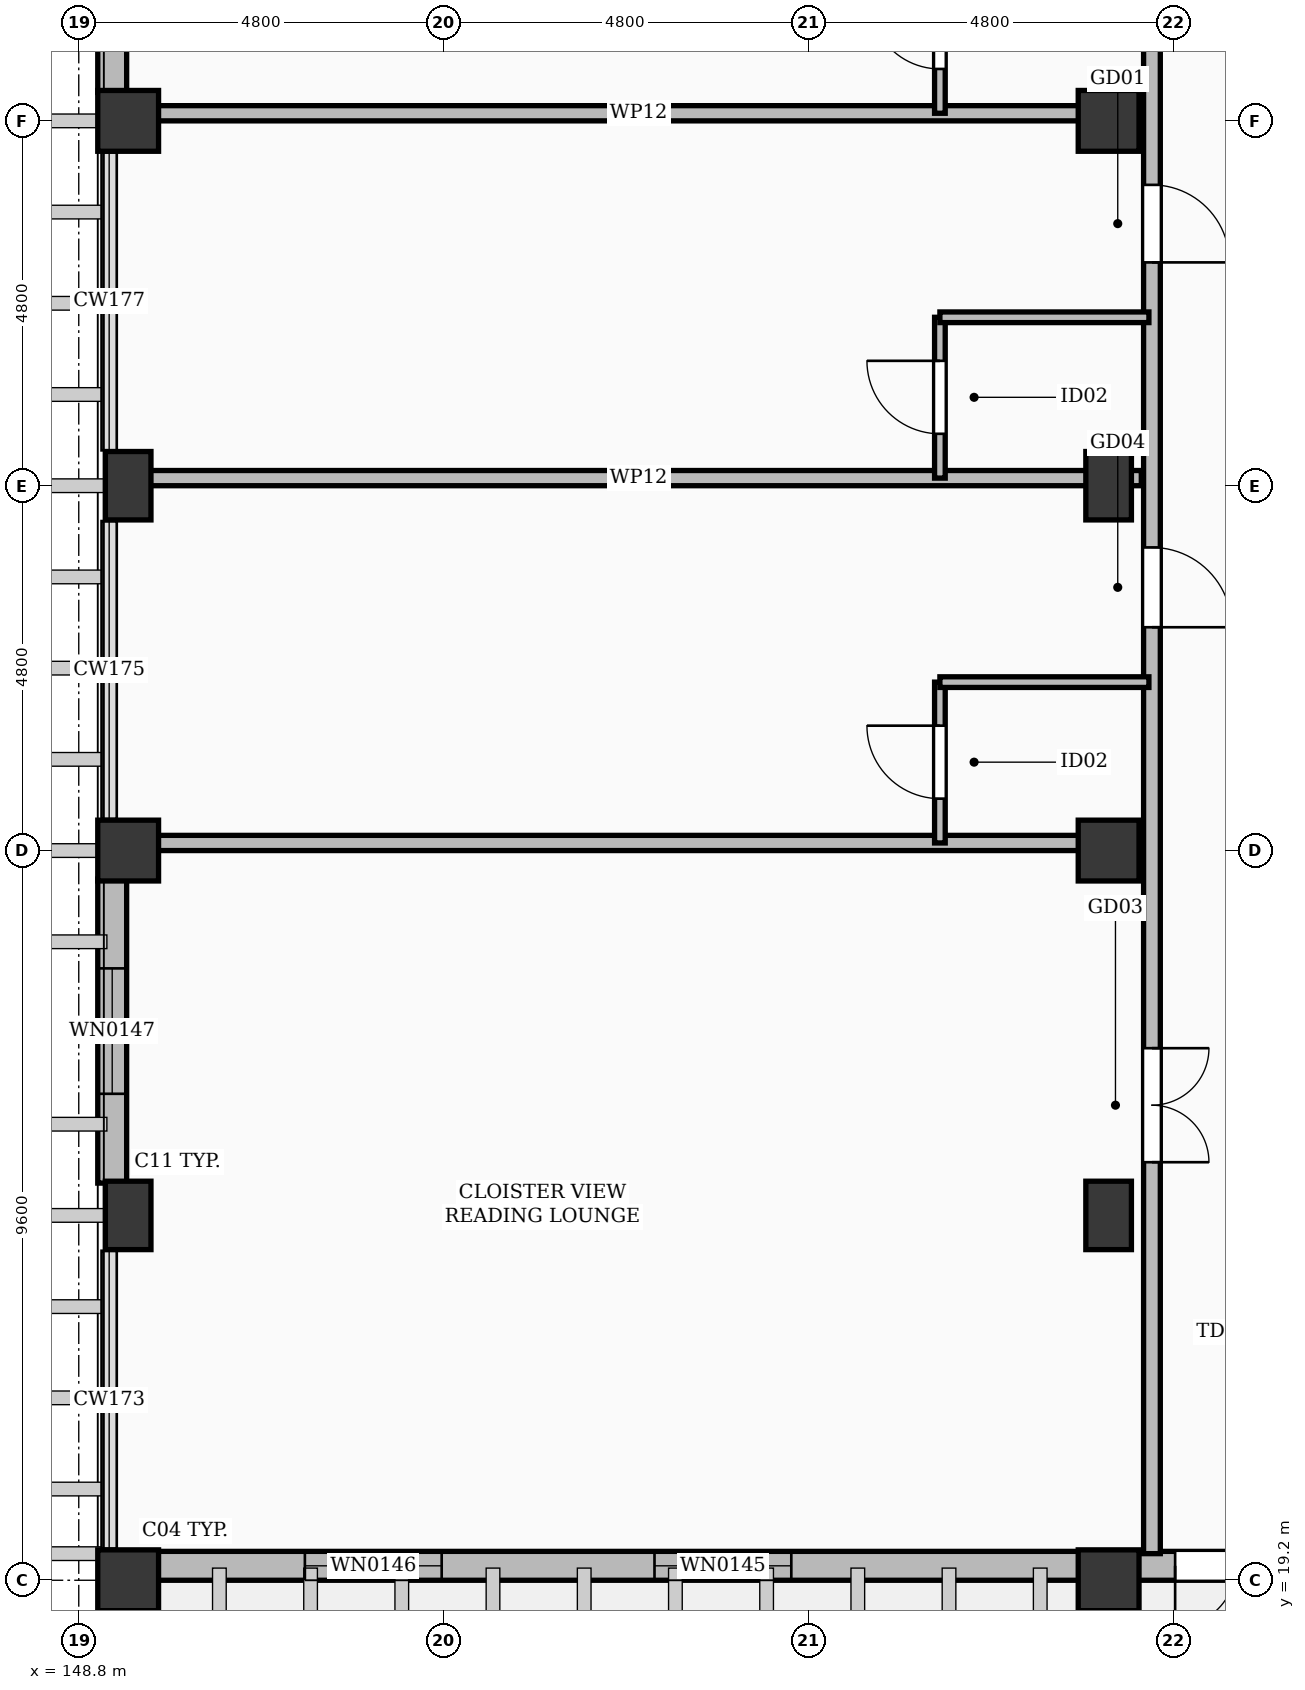
"""IFC4 building model, lengths in metres.
Left out: names, types, materials, properties, quantities, classifications, styles, units other than length and angle.
Written with IfcOpenShell. Run it as: python <this file> out.ifc"""

import sys

from ifc_helpers import new_model, si_unit, direction, frame, frame_2d, origin, origin_2d, place, context, subcontext, project, spatial, rectangle, extrude, element, fill, save


model = new_model("IFC4")
c1 = context("Model", 3, precision=1e-05, world=origin(), true_north=direction((0.0, 1.0)))
c2 = subcontext(c1, "Body", "Model", "MODEL_VIEW")
j1 = project(units=[si_unit("LENGTHUNIT", "METRE"), si_unit("PLANEANGLEUNIT", "RADIAN")], contexts=[c1])
p1 = place(None, origin())
s1 = spatial("IfcSite", under=j1, at=p1, CompositionType="ELEMENT")
p2 = place(p1, origin())
s2 = spatial("IfcBuilding", under=s1, at=p2, CompositionType="ELEMENT")
p3 = place(p2, frame((0.0, 0.0, 21.0)))
s3 = spatial("IfcBuildingStorey", under=s2, at=p3, CompositionType="ELEMENT", Elevation=21.0)
for number, where, z_axis, x_axis in (
    (1, (149.45, 19.2, 0.0), (0.0, 0.0, 1.0), (1.0, 0.0, 0.0)),
    (2, (149.45, 28.8, 0.0), (0.0, 0.0, 1.0), (1.0, 0.0, 0.0)),
    (3, (149.45, 38.4, 0.0), (0.0, 0.0, 1.0), (1.0, 0.0, 0.0)),
    (4, (162.35, 19.2, 0.0), (0.0, 0.0, 1.0), (1.0, 0.0, 0.0)),
    (5, (162.35, 28.8, 0.0), (0.0, 0.0, 1.0), (1.0, 0.0, 0.0)),
    (6, (162.35, 38.4, 0.0), (0.0, 0.0, 1.0), (1.0, 0.0, 0.0)),
):
    element("IfcColumn", number, at=place(p3, frame(where, z_axis=z_axis, x_axis=x_axis)), inside=s3, PredefinedType="COLUMN", context=c2, shape_type="SweptSolid", body=[
        extrude(rectangle(XDim=0.8, YDim=0.8, at=origin_2d()), origin(), (0.0, 0.0, 1.0), 3.6),
    ])
for number, where, z_axis, x_axis in (
    (7, (149.45, 24.0, -0.26), (0.0, 0.0, 1.0), (1.0, 0.0, 0.0)),
    (8, (149.45, 33.6, -0.26), (0.0, 0.0, 1.0), (1.0, 0.0, 0.0)),
    (9, (162.35, 24.0, -0.26), (0.0, 0.0, 1.0), (1.0, 0.0, 0.0)),
    (10, (162.35, 33.6, -0.26), (0.0, 0.0, 1.0), (1.0, 0.0, 0.0)),
):
    element("IfcColumn", number, at=place(p3, frame(where, z_axis=z_axis, x_axis=x_axis)), inside=s3, PredefinedType="COLUMN", context=c2, shape_type="SweptSolid", body=[
        extrude(rectangle(XDim=0.6, YDim=0.9, at=origin_2d()), origin(), (0.0, 0.0, 1.0), 3.86),
    ])
p4 = place(p3, frame((178.975, 19.39, 0.0), z_axis=(0.0, 0.0, 1.0), x_axis=(-1.0, 0.0, 0.0)))
e11 = element("IfcWall", 11, at=p4, inside=s3, PredefinedType="SOLIDWALL", context=c2, shape_type="SweptSolid", body=[
    extrude(rectangle(XDim=29.15, YDim=0.38, at=frame_2d((14.575, 0.0))), origin(), (0.0, 0.0, 1.0), 2.652),
])
p5 = place(p4, frame((14.15, 0.0, 0.0)))
e12 = element("IfcOpeningElement", 12, at=p5, cuts=e11, PredefinedType="OPENING", context=c2, shape_type="SweptSolid", body=[
    extrude(rectangle(XDim=1.6, YDim=2.25, at=frame_2d((0.8, 1.125))), frame((0.0, 0.202, 0.0), z_axis=(0.0, -1.0, 0.0), x_axis=(1.0, 0.0, 0.0)), (0.0, 0.0, 1.0), 0.404),
])
p6 = place(p4, frame((4.0, 0.0, 0.55)))
e13 = element("IfcOpeningElement", 13, at=p6, cuts=e11, PredefinedType="OPENING", context=c2, shape_type="SweptSolid", body=[
    extrude(rectangle(XDim=1.8, YDim=1.76, at=frame_2d((0.9, 0.88))), frame((0.0, 0.202, 0.0), z_axis=(0.0, -1.0, 0.0), x_axis=(1.0, 0.0, 0.0)), (0.0, 0.0, 1.0), 0.404),
])
p7 = place(p4, frame((9.6, 0.0, 0.55)))
e14 = element("IfcOpeningElement", 14, at=p7, cuts=e11, PredefinedType="OPENING", context=c2, shape_type="SweptSolid", body=[
    extrude(rectangle(XDim=1.8, YDim=1.76, at=frame_2d((0.9, 0.88))), frame((0.0, 0.202, 0.0), z_axis=(0.0, -1.0, 0.0), x_axis=(1.0, 0.0, 0.0)), (0.0, 0.0, 1.0), 0.404),
])
p8 = place(p4, frame((20.8, 0.0, 0.55)))
e15 = element("IfcOpeningElement", 15, at=p8, cuts=e11, PredefinedType="OPENING", context=c2, shape_type="SweptSolid", body=[
    extrude(rectangle(XDim=1.8, YDim=1.76, at=frame_2d((0.9, 0.88))), frame((0.0, 0.202, 0.0), z_axis=(0.0, -1.0, 0.0), x_axis=(1.0, 0.0, 0.0)), (0.0, 0.0, 1.0), 0.404),
])
p9 = place(p4, frame((25.4, 0.0, 0.55)))
e16 = element("IfcOpeningElement", 16, at=p9, cuts=e11, PredefinedType="OPENING", context=c2, shape_type="SweptSolid", body=[
    extrude(rectangle(XDim=1.8, YDim=1.76, at=frame_2d((0.9, 0.88))), frame((0.0, 0.202, 0.0), z_axis=(0.0, -1.0, 0.0), x_axis=(1.0, 0.0, 0.0)), (0.0, 0.0, 1.0), 0.404),
])
p10 = place(p3, frame((149.24, 24.425, 0.0), z_axis=(0.0, 0.0, 1.0), x_axis=(0.0, 1.0, 0.0)))
e17 = element("IfcWall", 17, at=p10, inside=s3, PredefinedType="SOLIDWALL", context=c2, shape_type="SweptSolid", body=[
    extrude(rectangle(XDim=4.0, YDim=0.38, at=frame_2d((2.0, 0.0))), origin(), (0.0, 0.0, 1.0), 2.652),
])
p11 = place(p10, frame((1.175, 0.0, 0.55)))
e18 = element("IfcOpeningElement", 18, at=p11, cuts=e17, PredefinedType="OPENING", context=c2, shape_type="SweptSolid", body=[
    extrude(rectangle(XDim=1.65, YDim=1.75, at=frame_2d((0.825, 0.875))), frame((0.0, 0.202, 0.0), z_axis=(0.0, -1.0, 0.0), x_axis=(1.0, 0.0, 0.0)), (0.0, 0.0, 1.0), 0.404),
])
p12 = place(p3, frame((149.24, 38.775, 0.0), z_axis=(0.0, 0.0, 1.0), x_axis=(0.0, 1.0, 0.0)))
e19 = element("IfcWall", 19, at=p12, inside=s3, PredefinedType="SOLIDWALL", context=c2, shape_type="SweptSolid", body=[
    extrude(rectangle(XDim=4.0, YDim=0.38, at=frame_2d((2.0, 0.0))), origin(), (0.0, 0.0, 1.0), 2.652),
])
p13 = place(p12, frame((1.325, 0.0, 0.55)))
e20 = element("IfcOpeningElement", 20, at=p13, cuts=e19, PredefinedType="OPENING", context=c2, shape_type="SweptSolid", body=[
    extrude(rectangle(XDim=1.35, YDim=1.73, at=frame_2d((0.675, 0.865))), frame((0.0, 0.202, 0.0), z_axis=(0.0, -1.0, 0.0), x_axis=(1.0, 0.0, 0.0)), (0.0, 0.0, 1.0), 0.404),
])
p14 = place(p3, frame((162.92, 19.55, 0.0), z_axis=(0.0, 0.0, 1.0), x_axis=(0.0, 1.0, 0.0)))
e21 = element("IfcWall", 21, at=p14, inside=s3, PredefinedType="PARTITIONING", context=c2, shape_type="SweptSolid", body=[
    extrude(rectangle(XDim=53.65, YDim=0.22, at=frame_2d((26.825, 0.0))), origin(), (0.0, 0.0, 1.0), 2.652),
])
p15 = place(p14, frame((5.15, 0.0, 0.0)))
e22 = element("IfcOpeningElement", 22, at=p15, cuts=e21, PredefinedType="OPENING", context=c2, shape_type="SweptSolid", body=[
    extrude(rectangle(XDim=1.5, YDim=2.3, at=frame_2d((0.75, 1.15))), frame((0.0, 0.122, 0.0), z_axis=(0.0, -1.0, 0.0), x_axis=(1.0, 0.0, 0.0)), (0.0, 0.0, 1.0), 0.244),
])
p16 = place(p14, frame((12.188, 0.0, 0.0)))
e23 = element("IfcOpeningElement", 23, at=p16, cuts=e21, PredefinedType="OPENING", context=c2, shape_type="SweptSolid", body=[
    extrude(rectangle(XDim=1.05, YDim=2.22, at=frame_2d((0.525, 1.11))), frame((0.0, 0.122, 0.0), z_axis=(0.0, -1.0, 0.0), x_axis=(1.0, 0.0, 0.0)), (0.0, 0.0, 1.0), 0.244),
])
p17 = place(p14, frame((16.988, 0.0, 0.0)))
e24 = element("IfcOpeningElement", 24, at=p17, cuts=e21, PredefinedType="OPENING", context=c2, shape_type="SweptSolid", body=[
    extrude(rectangle(XDim=1.02, YDim=2.2, at=frame_2d((0.51, 1.1))), frame((0.0, 0.122, 0.0), z_axis=(0.0, -1.0, 0.0), x_axis=(1.0, 0.0, 0.0)), (0.0, 0.0, 1.0), 0.244),
])
p18 = place(p14, frame((21.788, 0.0, 0.0)))
e25 = element("IfcOpeningElement", 25, at=p18, cuts=e21, PredefinedType="OPENING", context=c2, shape_type="SweptSolid", body=[
    extrude(rectangle(XDim=1.14, YDim=2.26, at=frame_2d((0.57, 1.13))), frame((0.0, 0.122, 0.0), z_axis=(0.0, -1.0, 0.0), x_axis=(1.0, 0.0, 0.0)), (0.0, 0.0, 1.0), 0.244),
])
p19 = place(p14, frame((26.588, 0.0, 0.0)))
e26 = element("IfcOpeningElement", 26, at=p19, cuts=e21, PredefinedType="OPENING", context=c2, shape_type="SweptSolid", body=[
    extrude(rectangle(XDim=0.98, YDim=2.15, at=frame_2d((0.49, 1.075))), frame((0.0, 0.122, 0.0), z_axis=(0.0, -1.0, 0.0), x_axis=(1.0, 0.0, 0.0)), (0.0, 0.0, 1.0), 0.244),
])
p20 = place(p14, frame((31.038, 0.0, 0.0)))
e27 = element("IfcOpeningElement", 27, at=p20, cuts=e21, PredefinedType="OPENING", context=c2, shape_type="SweptSolid", body=[
    extrude(rectangle(XDim=1.28, YDim=2.16, at=frame_2d((0.64, 1.08))), frame((0.0, 0.122, 0.0), z_axis=(0.0, -1.0, 0.0), x_axis=(1.0, 0.0, 0.0)), (0.0, 0.0, 1.0), 0.244),
])
p21 = place(p14, frame((36.188, 0.0, 0.0)))
e28 = element("IfcOpeningElement", 28, at=p21, cuts=e21, PredefinedType="OPENING", context=c2, shape_type="SweptSolid", body=[
    extrude(rectangle(XDim=0.9, YDim=2.08, at=frame_2d((0.45, 1.04))), frame((0.0, 0.122, 0.0), z_axis=(0.0, -1.0, 0.0), x_axis=(1.0, 0.0, 0.0)), (0.0, 0.0, 1.0), 0.244),
])
p22 = place(p14, frame((40.988, 0.0, 0.0)))
e29 = element("IfcOpeningElement", 29, at=p22, cuts=e21, PredefinedType="OPENING", context=c2, shape_type="SweptSolid", body=[
    extrude(rectangle(XDim=1.05, YDim=2.22, at=frame_2d((0.525, 1.11))), frame((0.0, 0.122, 0.0), z_axis=(0.0, -1.0, 0.0), x_axis=(1.0, 0.0, 0.0)), (0.0, 0.0, 1.0), 0.244),
])
p23 = place(p14, frame((45.788, 0.0, 0.0)))
e30 = element("IfcOpeningElement", 30, at=p23, cuts=e21, PredefinedType="OPENING", context=c2, shape_type="SweptSolid", body=[
    extrude(rectangle(XDim=1.02, YDim=2.2, at=frame_2d((0.51, 1.1))), frame((0.0, 0.122, 0.0), z_axis=(0.0, -1.0, 0.0), x_axis=(1.0, 0.0, 0.0)), (0.0, 0.0, 1.0), 0.244),
])
p24 = place(p14, frame((50.588, 0.0, 0.0)))
e31 = element("IfcOpeningElement", 31, at=p24, cuts=e21, PredefinedType="OPENING", context=c2, shape_type="SweptSolid", body=[
    extrude(rectangle(XDim=1.14, YDim=2.26, at=frame_2d((0.57, 1.13))), frame((0.0, 0.122, 0.0), z_axis=(0.0, -1.0, 0.0), x_axis=(1.0, 0.0, 0.0)), (0.0, 0.0, 1.0), 0.244),
])
p25 = place(p3, frame((149.55, 28.9, 0.0), z_axis=(0.0, 0.0, 1.0), x_axis=(1.0, 0.0, 0.0)))
e32 = element("IfcWall", 32, at=p25, inside=s3, PredefinedType="PARTITIONING", context=c2, shape_type="SweptSolid", body=[
    extrude(rectangle(XDim=13.23, YDim=0.2, at=frame_2d((6.615, 0.0))), origin(), (0.0, 0.0, 1.0), 2.652),
])
p26 = place(p3, frame((160.13, 28.9, 0.0), z_axis=(0.0, 0.0, 1.0), x_axis=(0.0, 1.0, 0.0)))
e33 = element("IfcWall", 33, at=p26, inside=s3, PredefinedType="PARTITIONING", context=c2, shape_type="SweptSolid", body=[
    extrude(rectangle(XDim=2.116, YDim=0.14, at=frame_2d((1.058, 0.0))), origin(), (0.0, 0.0, 1.0), 2.652),
])
p27 = place(p26, frame((0.583, 0.0, 0.0)))
e34 = element("IfcOpeningElement", 34, at=p27, cuts=e33, PredefinedType="OPENING", context=c2, shape_type="SweptSolid", body=[
    extrude(rectangle(XDim=0.96, YDim=2.12, at=frame_2d((0.48, 1.06))), frame((0.0, 0.082, 0.0), z_axis=(0.0, -1.0, 0.0), x_axis=(1.0, 0.0, 0.0)), (0.0, 0.0, 1.0), 0.164),
])
p28 = place(p3, frame((160.13, 31.016, 0.0), z_axis=(0.0, 0.0, 1.0), x_axis=(1.0, 0.0, 0.0)))
e35 = element("IfcWall", 35, at=p28, inside=s3, PredefinedType="PARTITIONING", context=c2, shape_type="SweptSolid", body=[
    extrude(rectangle(XDim=2.75, YDim=0.14, at=frame_2d((1.375, 0.0))), origin(), (0.0, 0.0, 1.0), 2.652),
])
p29 = place(p3, frame((149.55, 33.7, 0.0), z_axis=(0.0, 0.0, 1.0), x_axis=(1.0, 0.0, 0.0)))
e36 = element("IfcWall", 36, at=p29, inside=s3, PredefinedType="PARTITIONING", context=c2, shape_type="SweptSolid", body=[
    extrude(rectangle(XDim=13.23, YDim=0.2, at=frame_2d((6.615, 0.0))), origin(), (0.0, 0.0, 1.0), 2.652),
])
p30 = place(p3, frame((160.13, 33.7, 0.0), z_axis=(0.0, 0.0, 1.0), x_axis=(0.0, 1.0, 0.0)))
e37 = element("IfcWall", 37, at=p30, inside=s3, PredefinedType="PARTITIONING", context=c2, shape_type="SweptSolid", body=[
    extrude(rectangle(XDim=2.116, YDim=0.14, at=frame_2d((1.058, 0.0))), origin(), (0.0, 0.0, 1.0), 2.652),
])
p31 = place(p30, frame((0.583, 0.0, 0.0)))
e38 = element("IfcOpeningElement", 38, at=p31, cuts=e37, PredefinedType="OPENING", context=c2, shape_type="SweptSolid", body=[
    extrude(rectangle(XDim=0.96, YDim=2.12, at=frame_2d((0.48, 1.06))), frame((0.0, 0.082, 0.0), z_axis=(0.0, -1.0, 0.0), x_axis=(1.0, 0.0, 0.0)), (0.0, 0.0, 1.0), 0.164),
])
p32 = place(p3, frame((160.13, 35.816, 0.0), z_axis=(0.0, 0.0, 1.0), x_axis=(1.0, 0.0, 0.0)))
e39 = element("IfcWall", 39, at=p32, inside=s3, PredefinedType="PARTITIONING", context=c2, shape_type="SweptSolid", body=[
    extrude(rectangle(XDim=2.75, YDim=0.14, at=frame_2d((1.375, 0.0))), origin(), (0.0, 0.0, 1.0), 2.652),
])
p33 = place(p3, frame((149.55, 38.5, 0.0), z_axis=(0.0, 0.0, 1.0), x_axis=(1.0, 0.0, 0.0)))
e40 = element("IfcWall", 40, at=p33, inside=s3, PredefinedType="PARTITIONING", context=c2, shape_type="SweptSolid", body=[
    extrude(rectangle(XDim=13.23, YDim=0.2, at=frame_2d((6.615, 0.0))), origin(), (0.0, 0.0, 1.0), 2.652),
])
p34 = place(p3, frame((160.13, 38.5, 0.0), z_axis=(0.0, 0.0, 1.0), x_axis=(0.0, 1.0, 0.0)))
e41 = element("IfcWall", 41, at=p34, inside=s3, PredefinedType="PARTITIONING", context=c2, shape_type="SweptSolid", body=[
    extrude(rectangle(XDim=2.116, YDim=0.14, at=frame_2d((1.058, 0.0))), origin(), (0.0, 0.0, 1.0), 2.652),
])
p35 = place(p34, frame((0.583, 0.0, 0.0)))
e42 = element("IfcOpeningElement", 42, at=p35, cuts=e41, PredefinedType="OPENING", context=c2, shape_type="SweptSolid", body=[
    extrude(rectangle(XDim=0.92, YDim=2.1, at=frame_2d((0.46, 1.05))), frame((0.0, 0.082, 0.0), z_axis=(0.0, -1.0, 0.0), x_axis=(1.0, 0.0, 0.0)), (0.0, 0.0, 1.0), 0.164),
])
p36 = place(p5, origin())
e43 = element("IfcDoor", 43, at=p36, inside=s3, OperationType="DOUBLE_DOOR_SINGLE_SWING", PredefinedType="DOOR", context=c2, shape_type="SweptSolid", body=[
    extrude(rectangle(XDim=1.6, YDim=2.25, at=frame_2d((0.8, 1.125))), frame((0.0, 0.025, 0.0), z_axis=(0.0, -1.0, 0.0), x_axis=(1.0, 0.0, 0.0)), (0.0, 0.0, 1.0), 0.05),
])
fill(e12, e43)
p37 = place(p8, origin())
e44 = element("IfcWindow", 44, at=p37, inside=s3, PartitioningType="SINGLE_PANEL", PredefinedType="WINDOW", context=c2, shape_type="SweptSolid", body=[
    extrude(rectangle(XDim=1.8, YDim=1.76, at=frame_2d((0.9, 0.88))), frame((0.0, 0.03, 0.0), z_axis=(0.0, -1.0, 0.0), x_axis=(1.0, 0.0, 0.0)), (0.0, 0.0, 1.0), 0.06),
])
fill(e15, e44)
p38 = place(p9, origin())
e45 = element("IfcWindow", 45, at=p38, inside=s3, PartitioningType="SINGLE_PANEL", PredefinedType="WINDOW", context=c2, shape_type="SweptSolid", body=[
    extrude(rectangle(XDim=1.8, YDim=1.76, at=frame_2d((0.9, 0.88))), frame((0.0, 0.03, 0.0), z_axis=(0.0, -1.0, 0.0), x_axis=(1.0, 0.0, 0.0)), (0.0, 0.0, 1.0), 0.06),
])
fill(e16, e45)
p39 = place(p11, origin())
e46 = element("IfcWindow", 46, at=p39, inside=s3, PartitioningType="SINGLE_PANEL", PredefinedType="WINDOW", context=c2, shape_type="SweptSolid", body=[
    extrude(rectangle(XDim=1.65, YDim=1.75, at=frame_2d((0.825, 0.875))), frame((0.0, 0.03, 0.0), z_axis=(0.0, -1.0, 0.0), x_axis=(1.0, 0.0, 0.0)), (0.0, 0.0, 1.0), 0.06),
])
fill(e18, e46)
p40 = place(p15, frame((1.5, 0.0, 0.0), z_axis=(0.0, 0.0, 1.0), x_axis=(-1.0, 0.0, 0.0)))
e47 = element("IfcDoor", 47, at=p40, inside=s3, OperationType="DOUBLE_DOOR_SINGLE_SWING", PredefinedType="DOOR", context=c2, shape_type="SweptSolid", body=[
    extrude(rectangle(XDim=1.5, YDim=2.3, at=frame_2d((0.75, 1.15))), frame((0.0, 0.025, 0.0), z_axis=(0.0, -1.0, 0.0), x_axis=(1.0, 0.0, 0.0)), (0.0, 0.0, 1.0), 0.05),
])
fill(e22, e47)
p41 = place(p16, frame((1.05, 0.0, 0.0), z_axis=(0.0, 0.0, 1.0), x_axis=(-1.0, 0.0, 0.0)))
e48 = element("IfcDoor", 48, at=p41, inside=s3, OperationType="SINGLE_SWING_LEFT", PredefinedType="DOOR", context=c2, shape_type="SweptSolid", body=[
    extrude(rectangle(XDim=1.05, YDim=2.22, at=frame_2d((0.525, 1.11))), frame((0.0, 0.025, 0.0), z_axis=(0.0, -1.0, 0.0), x_axis=(1.0, 0.0, 0.0)), (0.0, 0.0, 1.0), 0.05),
])
fill(e23, e48)
p42 = place(p27, origin())
e49 = element("IfcDoor", 49, at=p42, inside=s3, OperationType="SINGLE_SWING_RIGHT", PredefinedType="DOOR", context=c2, shape_type="SweptSolid", body=[
    extrude(rectangle(XDim=0.96, YDim=2.12, at=frame_2d((0.48, 1.06))), frame((0.0, 0.025, 0.0), z_axis=(0.0, -1.0, 0.0), x_axis=(1.0, 0.0, 0.0)), (0.0, 0.0, 1.0), 0.05),
])
fill(e34, e49)
p43 = place(p17, frame((1.02, 0.0, 0.0), z_axis=(0.0, 0.0, 1.0), x_axis=(-1.0, 0.0, 0.0)))
e50 = element("IfcDoor", 50, at=p43, inside=s3, OperationType="SINGLE_SWING_LEFT", PredefinedType="DOOR", context=c2, shape_type="SweptSolid", body=[
    extrude(rectangle(XDim=1.02, YDim=2.2, at=frame_2d((0.51, 1.1))), frame((0.0, 0.025, 0.0), z_axis=(0.0, -1.0, 0.0), x_axis=(1.0, 0.0, 0.0)), (0.0, 0.0, 1.0), 0.05),
])
fill(e24, e50)
p44 = place(p31, origin())
e51 = element("IfcDoor", 51, at=p44, inside=s3, OperationType="SINGLE_SWING_RIGHT", PredefinedType="DOOR", context=c2, shape_type="SweptSolid", body=[
    extrude(rectangle(XDim=0.96, YDim=2.12, at=frame_2d((0.48, 1.06))), frame((0.0, 0.025, 0.0), z_axis=(0.0, -1.0, 0.0), x_axis=(1.0, 0.0, 0.0)), (0.0, 0.0, 1.0), 0.05),
])
fill(e38, e51)
p45 = place(p35, origin())
e52 = element("IfcDoor", 52, at=p45, inside=s3, OperationType="SINGLE_SWING_RIGHT", PredefinedType="DOOR", context=c2, shape_type="SweptSolid", body=[
    extrude(rectangle(XDim=0.92, YDim=2.1, at=frame_2d((0.46, 1.05))), frame((0.0, 0.025, 0.0), z_axis=(0.0, -1.0, 0.0), x_axis=(1.0, 0.0, 0.0)), (0.0, 0.0, 1.0), 0.05),
])
fill(e42, e52)
save(model, sys.argv[1])
